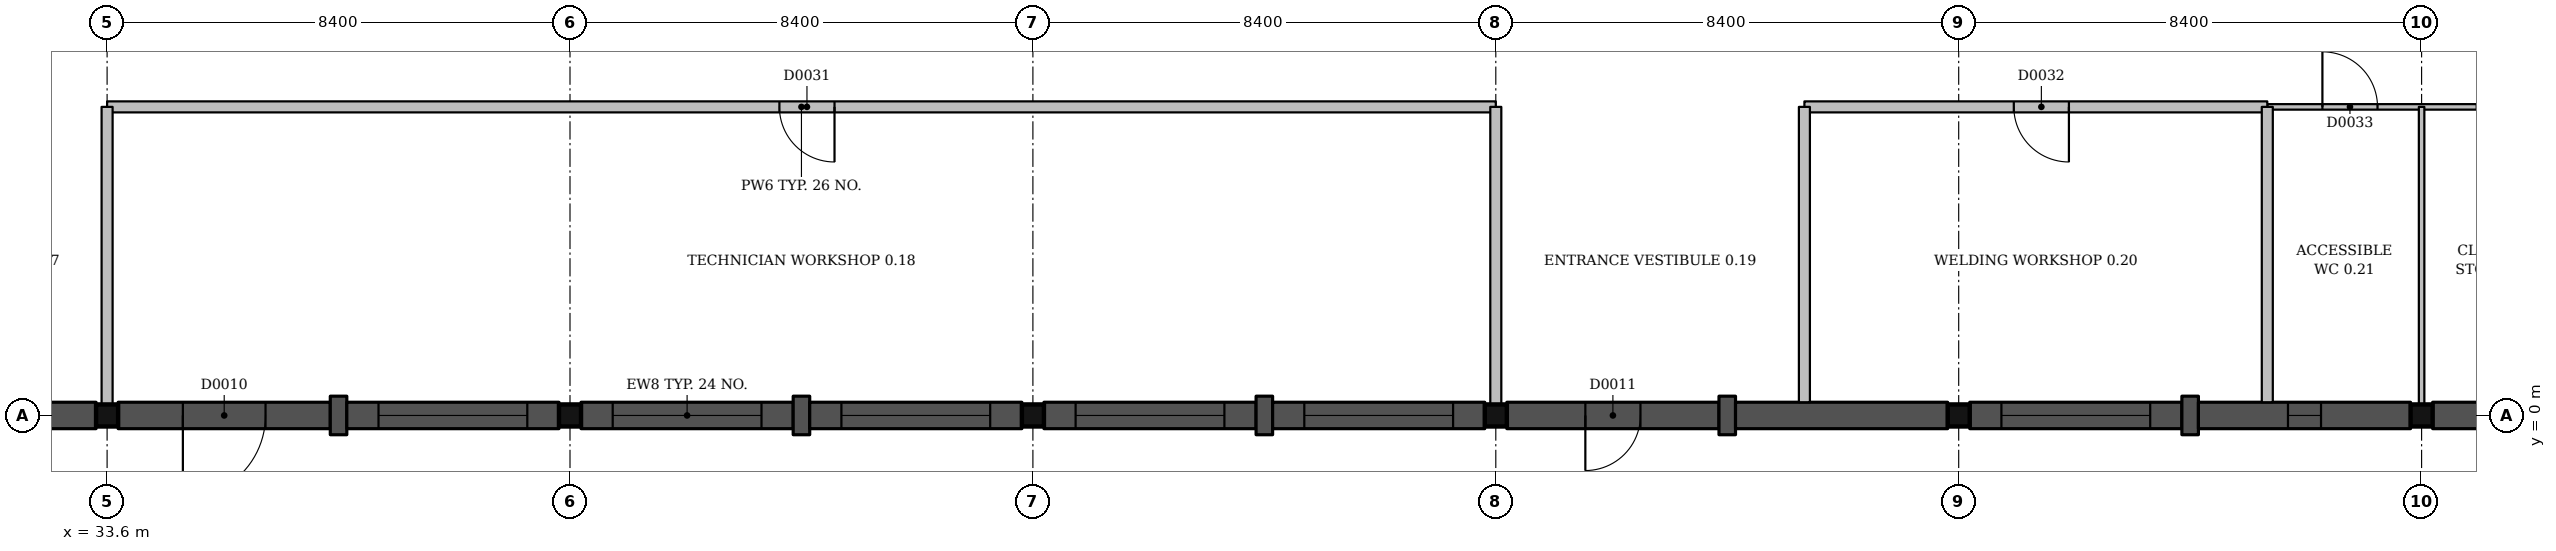
"""IFC4 building model, lengths in metres.
Left out: names, types, materials, properties, quantities, classifications, styles, units other than length and angle.
Written with IfcOpenShell. Run it as: python <this file> out.ifc"""

import sys

from ifc_helpers import new_model, si_unit, direction, frame, frame_2d, origin, origin_2d, place, context, subcontext, project, spatial, rectangle, extrude, element, fill, save


model = new_model("IFC4")
c1 = context("Model", 3, precision=1e-05, world=origin(), true_north=direction((0.0, 1.0)))
c2 = subcontext(c1, "Body", "Model", "MODEL_VIEW")
j1 = project(units=[si_unit("LENGTHUNIT", "METRE"), si_unit("PLANEANGLEUNIT", "RADIAN")], contexts=[c1])
p1 = place(None, origin())
s1 = spatial("IfcSite", under=j1, at=p1, CompositionType="ELEMENT")
p2 = place(p1, origin())
s2 = spatial("IfcBuilding", under=s1, at=p2, CompositionType="ELEMENT")
p3 = place(p2, origin())
s3 = spatial("IfcBuildingStorey", under=s2, at=p3, CompositionType="ELEMENT", Elevation=0.0)
for number, where, z_axis, x_axis in (
    (1, (33.6, 0.0, -1.5), (0.0, 0.0, 1.0), (1.0, 0.0, 0.0)),
    (2, (42.0, 0.0, -1.5), (0.0, 0.0, 1.0), (1.0, 0.0, 0.0)),
    (3, (50.4, 0.0, -1.5), (0.0, 0.0, 1.0), (1.0, 0.0, 0.0)),
    (4, (58.8, 0.0, -1.5), (0.0, 0.0, 1.0), (1.0, 0.0, 0.0)),
    (5, (67.2, 0.0, -1.5), (0.0, 0.0, 1.0), (1.0, 0.0, 0.0)),
    (6, (75.6, 0.0, -1.5), (0.0, 0.0, 1.0), (1.0, 0.0, 0.0)),
):
    element("IfcColumn", number, at=place(p3, frame(where, z_axis=z_axis, x_axis=x_axis)), inside=s3, PredefinedType="COLUMN", context=c2, shape_type="SweptSolid", body=[
        extrude(rectangle(XDim=0.4, YDim=0.4, at=origin_2d()), origin(), (0.0, 0.0, 1.0), 6.0),
    ])
p4 = place(p3, frame((29.55, 0.0, 0.0), z_axis=(0.0, 0.0, 1.0), x_axis=(1.0, 0.0, 0.0)))
e7 = element("IfcWall", 7, at=p4, inside=s3, PredefinedType="SOLIDWALL", context=c2, shape_type="SweptSolid", body=[
    extrude(rectangle(XDim=3.85, YDim=0.48, at=frame_2d((1.925, 0.0))), origin(), (0.0, 0.0, 1.0), 3.45),
])
p5 = place(p4, frame((1.425, 0.0, 0.0)))
e8 = element("IfcOpeningElement", 8, at=p5, cuts=e7, PredefinedType="OPENING", context=c2, shape_type="SweptSolid", body=[
    extrude(rectangle(XDim=1.0, YDim=2.1, at=frame_2d((0.5, 1.05))), frame((0.0, 0.25, 0.0), z_axis=(0.0, -1.0, 0.0), x_axis=(1.0, 0.0, 0.0)), (0.0, 0.0, 1.0), 0.5),
])
p6 = place(p3, frame((33.8, 0.0, 0.0), z_axis=(0.0, 0.0, 1.0), x_axis=(1.0, 0.0, 0.0)))
e9 = element("IfcWall", 9, at=p6, inside=s3, PredefinedType="SOLIDWALL", context=c2, shape_type="SweptSolid", body=[
    extrude(rectangle(XDim=3.85, YDim=0.48, at=frame_2d((1.925, 0.0))), origin(), (0.0, 0.0, 1.0), 3.45),
])
p7 = place(p6, frame((1.175, 0.0, 0.0)))
e10 = element("IfcOpeningElement", 10, at=p7, cuts=e9, PredefinedType="OPENING", context=c2, shape_type="SweptSolid", body=[
    extrude(rectangle(XDim=1.5, YDim=2.1, at=frame_2d((0.75, 1.05))), frame((0.0, 0.25, 0.0), z_axis=(0.0, -1.0, 0.0), x_axis=(1.0, 0.0, 0.0)), (0.0, 0.0, 1.0), 0.5),
])
p8 = place(p3, frame((37.65, 0.0, 0.0), z_axis=(0.0, 0.0, 1.0), x_axis=(1.0, 0.0, 0.0)))
e11 = element("IfcWall", 11, at=p8, inside=s3, PredefinedType="SOLIDWALL", context=c2, shape_type="SweptSolid", body=[
    extrude(rectangle(XDim=0.3, YDim=0.7, at=frame_2d((0.15, 0.0))), origin(), (0.0, 0.0, 1.0), 3.45),
])
p9 = place(p3, frame((37.95, 0.0, 0.0), z_axis=(0.0, 0.0, 1.0), x_axis=(1.0, 0.0, 0.0)))
e12 = element("IfcWall", 12, at=p9, inside=s3, PredefinedType="SOLIDWALL", context=c2, shape_type="SweptSolid", body=[
    extrude(rectangle(XDim=3.85, YDim=0.48, at=frame_2d((1.925, 0.0))), origin(), (0.0, 0.0, 1.0), 3.45),
])
p10 = place(p9, frame((0.575, 0.0, 1.2)))
e13 = element("IfcOpeningElement", 13, at=p10, cuts=e12, PredefinedType="OPENING", context=c2, shape_type="SweptSolid", body=[
    extrude(rectangle(XDim=2.7, YDim=1.8, at=frame_2d((1.35, 0.9))), frame((0.0, 0.25, 0.0), z_axis=(0.0, -1.0, 0.0), x_axis=(1.0, 0.0, 0.0)), (0.0, 0.0, 1.0), 0.5),
])
p11 = place(p3, frame((42.2, 0.0, 0.0), z_axis=(0.0, 0.0, 1.0), x_axis=(1.0, 0.0, 0.0)))
e14 = element("IfcWall", 14, at=p11, inside=s3, PredefinedType="SOLIDWALL", context=c2, shape_type="SweptSolid", body=[
    extrude(rectangle(XDim=3.85, YDim=0.48, at=frame_2d((1.925, 0.0))), origin(), (0.0, 0.0, 1.0), 3.45),
])
p12 = place(p11, frame((0.575, 0.0, 1.2)))
e15 = element("IfcOpeningElement", 15, at=p12, cuts=e14, PredefinedType="OPENING", context=c2, shape_type="SweptSolid", body=[
    extrude(rectangle(XDim=2.7, YDim=1.8, at=frame_2d((1.35, 0.9))), frame((0.0, 0.25, 0.0), z_axis=(0.0, -1.0, 0.0), x_axis=(1.0, 0.0, 0.0)), (0.0, 0.0, 1.0), 0.5),
])
p13 = place(p3, frame((46.05, 0.0, 0.0), z_axis=(0.0, 0.0, 1.0), x_axis=(1.0, 0.0, 0.0)))
e16 = element("IfcWall", 16, at=p13, inside=s3, PredefinedType="SOLIDWALL", context=c2, shape_type="SweptSolid", body=[
    extrude(rectangle(XDim=0.3, YDim=0.7, at=frame_2d((0.15, 0.0))), origin(), (0.0, 0.0, 1.0), 3.45),
])
p14 = place(p3, frame((46.35, 0.0, 0.0), z_axis=(0.0, 0.0, 1.0), x_axis=(1.0, 0.0, 0.0)))
e17 = element("IfcWall", 17, at=p14, inside=s3, PredefinedType="SOLIDWALL", context=c2, shape_type="SweptSolid", body=[
    extrude(rectangle(XDim=3.85, YDim=0.48, at=frame_2d((1.925, 0.0))), origin(), (0.0, 0.0, 1.0), 3.45),
])
p15 = place(p14, frame((0.575, 0.0, 1.2)))
e18 = element("IfcOpeningElement", 18, at=p15, cuts=e17, PredefinedType="OPENING", context=c2, shape_type="SweptSolid", body=[
    extrude(rectangle(XDim=2.7, YDim=1.8, at=frame_2d((1.35, 0.9))), frame((0.0, 0.25, 0.0), z_axis=(0.0, -1.0, 0.0), x_axis=(1.0, 0.0, 0.0)), (0.0, 0.0, 1.0), 0.5),
])
p16 = place(p3, frame((50.6, 0.0, 0.0), z_axis=(0.0, 0.0, 1.0), x_axis=(1.0, 0.0, 0.0)))
e19 = element("IfcWall", 19, at=p16, inside=s3, PredefinedType="SOLIDWALL", context=c2, shape_type="SweptSolid", body=[
    extrude(rectangle(XDim=3.85, YDim=0.48, at=frame_2d((1.925, 0.0))), origin(), (0.0, 0.0, 1.0), 3.45),
])
p17 = place(p16, frame((0.575, 0.0, 1.2)))
e20 = element("IfcOpeningElement", 20, at=p17, cuts=e19, PredefinedType="OPENING", context=c2, shape_type="SweptSolid", body=[
    extrude(rectangle(XDim=2.7, YDim=1.8, at=frame_2d((1.35, 0.9))), frame((0.0, 0.25, 0.0), z_axis=(0.0, -1.0, 0.0), x_axis=(1.0, 0.0, 0.0)), (0.0, 0.0, 1.0), 0.5),
])
p18 = place(p3, frame((54.45, 0.0, 0.0), z_axis=(0.0, 0.0, 1.0), x_axis=(1.0, 0.0, 0.0)))
e21 = element("IfcWall", 21, at=p18, inside=s3, PredefinedType="SOLIDWALL", context=c2, shape_type="SweptSolid", body=[
    extrude(rectangle(XDim=0.3, YDim=0.7, at=frame_2d((0.15, 0.0))), origin(), (0.0, 0.0, 1.0), 3.45),
])
p19 = place(p3, frame((54.75, 0.0, 0.0), z_axis=(0.0, 0.0, 1.0), x_axis=(1.0, 0.0, 0.0)))
e22 = element("IfcWall", 22, at=p19, inside=s3, PredefinedType="SOLIDWALL", context=c2, shape_type="SweptSolid", body=[
    extrude(rectangle(XDim=3.85, YDim=0.48, at=frame_2d((1.925, 0.0))), origin(), (0.0, 0.0, 1.0), 3.45),
])
p20 = place(p19, frame((0.575, 0.0, 1.2)))
e23 = element("IfcOpeningElement", 23, at=p20, cuts=e22, PredefinedType="OPENING", context=c2, shape_type="SweptSolid", body=[
    extrude(rectangle(XDim=2.7, YDim=1.8, at=frame_2d((1.35, 0.9))), frame((0.0, 0.25, 0.0), z_axis=(0.0, -1.0, 0.0), x_axis=(1.0, 0.0, 0.0)), (0.0, 0.0, 1.0), 0.5),
])
p21 = place(p3, frame((59.0, 0.0, 0.0), z_axis=(0.0, 0.0, 1.0), x_axis=(1.0, 0.0, 0.0)))
e24 = element("IfcWall", 24, at=p21, inside=s3, PredefinedType="SOLIDWALL", context=c2, shape_type="SweptSolid", body=[
    extrude(rectangle(XDim=3.85, YDim=0.48, at=frame_2d((1.925, 0.0))), origin(), (0.0, 0.0, 1.0), 3.45),
])
p22 = place(p21, frame((1.425, 0.0, 0.0)))
e25 = element("IfcOpeningElement", 25, at=p22, cuts=e24, PredefinedType="OPENING", context=c2, shape_type="SweptSolid", body=[
    extrude(rectangle(XDim=1.0, YDim=2.1, at=frame_2d((0.5, 1.05))), frame((0.0, 0.25, 0.0), z_axis=(0.0, -1.0, 0.0), x_axis=(1.0, 0.0, 0.0)), (0.0, 0.0, 1.0), 0.5),
])
p23 = place(p3, frame((62.85, 0.0, 0.0), z_axis=(0.0, 0.0, 1.0), x_axis=(1.0, 0.0, 0.0)))
e26 = element("IfcWall", 26, at=p23, inside=s3, PredefinedType="SOLIDWALL", context=c2, shape_type="SweptSolid", body=[
    extrude(rectangle(XDim=0.3, YDim=0.7, at=frame_2d((0.15, 0.0))), origin(), (0.0, 0.0, 1.0), 3.45),
])
p24 = place(p3, frame((63.15, 0.0, 0.0), z_axis=(0.0, 0.0, 1.0), x_axis=(1.0, 0.0, 0.0)))
e27 = element("IfcWall", 27, at=p24, inside=s3, PredefinedType="SOLIDWALL", context=c2, shape_type="SweptSolid", body=[
    extrude(rectangle(XDim=3.85, YDim=0.48, at=frame_2d((1.925, 0.0))), origin(), (0.0, 0.0, 1.0), 3.45),
])
p25 = place(p3, frame((67.4, 0.0, 0.0), z_axis=(0.0, 0.0, 1.0), x_axis=(1.0, 0.0, 0.0)))
e28 = element("IfcWall", 28, at=p25, inside=s3, PredefinedType="SOLIDWALL", context=c2, shape_type="SweptSolid", body=[
    extrude(rectangle(XDim=3.85, YDim=0.48, at=frame_2d((1.925, 0.0))), origin(), (0.0, 0.0, 1.0), 3.45),
])
p26 = place(p25, frame((0.575, 0.0, 1.2)))
e29 = element("IfcOpeningElement", 29, at=p26, cuts=e28, PredefinedType="OPENING", context=c2, shape_type="SweptSolid", body=[
    extrude(rectangle(XDim=2.7, YDim=1.8, at=frame_2d((1.35, 0.9))), frame((0.0, 0.25, 0.0), z_axis=(0.0, -1.0, 0.0), x_axis=(1.0, 0.0, 0.0)), (0.0, 0.0, 1.0), 0.5),
])
p27 = place(p3, frame((71.25, 0.0, 0.0), z_axis=(0.0, 0.0, 1.0), x_axis=(1.0, 0.0, 0.0)))
e30 = element("IfcWall", 30, at=p27, inside=s3, PredefinedType="SOLIDWALL", context=c2, shape_type="SweptSolid", body=[
    extrude(rectangle(XDim=0.3, YDim=0.7, at=frame_2d((0.15, 0.0))), origin(), (0.0, 0.0, 1.0), 3.45),
])
p28 = place(p3, frame((71.55, 0.0, 0.0), z_axis=(0.0, 0.0, 1.0), x_axis=(1.0, 0.0, 0.0)))
e31 = element("IfcWall", 31, at=p28, inside=s3, PredefinedType="SOLIDWALL", context=c2, shape_type="SweptSolid", body=[
    extrude(rectangle(XDim=3.85, YDim=0.48, at=frame_2d((1.925, 0.0))), origin(), (0.0, 0.0, 1.0), 3.45),
])
p29 = place(p28, frame((1.625, 0.0, 1.5)))
e32 = element("IfcOpeningElement", 32, at=p29, cuts=e31, PredefinedType="OPENING", context=c2, shape_type="SweptSolid", body=[
    extrude(rectangle(XDim=0.6, YDim=1.2, at=frame_2d((0.3, 0.6))), frame((0.0, 0.25, 0.0), z_axis=(0.0, -1.0, 0.0), x_axis=(1.0, 0.0, 0.0)), (0.0, 0.0, 1.0), 0.5),
])
p30 = place(p3, frame((75.8, 0.0, 0.0), z_axis=(0.0, 0.0, 1.0), x_axis=(1.0, 0.0, 0.0)))
e33 = element("IfcWall", 33, at=p30, inside=s3, PredefinedType="SOLIDWALL", context=c2, shape_type="SweptSolid", body=[
    extrude(rectangle(XDim=3.85, YDim=0.48, at=frame_2d((1.925, 0.0))), origin(), (0.0, 0.0, 1.0), 3.45),
])
p31 = place(p30, frame((1.15, 0.0, 2.4)))
e34 = element("IfcOpeningElement", 34, at=p31, cuts=e33, PredefinedType="OPENING", context=c2, shape_type="SweptSolid", body=[
    extrude(rectangle(XDim=1.2, YDim=0.6, at=frame_2d((0.6, 0.3))), frame((0.0, 0.25, 0.0), z_axis=(0.0, -1.0, 0.0), x_axis=(1.0, 0.0, 0.0)), (0.0, 0.0, 1.0), 0.5),
])
p32 = place(p3, frame((72.8, 5.6, 0.0), z_axis=(0.0, 0.0, 1.0), x_axis=(1.0, 0.0, 0.0)))
e35 = element("IfcWall", 35, at=p32, inside=s3, PredefinedType="PARTITIONING", context=c2, shape_type="SweptSolid", body=[
    extrude(rectangle(XDim=5.6, YDim=0.1, at=frame_2d((2.8, 0.0))), origin(), (0.0, 0.0, 1.0), 3.5),
])
p33 = place(p32, frame((1.0, 0.0, 0.0)))
e36 = element("IfcOpeningElement", 36, at=p33, cuts=e35, PredefinedType="OPENING", context=c2, shape_type="SweptSolid", body=[
    extrude(rectangle(XDim=1.0, YDim=2.1, at=frame_2d((0.5, 1.05))), frame((0.0, 0.06, 0.0), z_axis=(0.0, -1.0, 0.0), x_axis=(1.0, 0.0, 0.0)), (0.0, 0.0, 1.0), 0.12),
])
p34 = place(p32, frame((3.8, 0.0, 0.0)))
e37 = element("IfcOpeningElement", 37, at=p34, cuts=e35, PredefinedType="OPENING", context=c2, shape_type="SweptSolid", body=[
    extrude(rectangle(XDim=0.9, YDim=2.1, at=frame_2d((0.45, 1.05))), frame((0.0, 0.06, 0.0), z_axis=(0.0, -1.0, 0.0), x_axis=(1.0, 0.0, 0.0)), (0.0, 0.0, 1.0), 0.12),
])
p35 = place(p3, frame((33.6, 5.6, 0.0), z_axis=(0.0, 0.0, 1.0), x_axis=(1.0, 0.0, 0.0)))
e38 = element("IfcWall", 38, at=p35, inside=s3, PredefinedType="PARTITIONING", context=c2, shape_type="SweptSolid", body=[
    extrude(rectangle(XDim=25.2, YDim=0.2, at=frame_2d((12.6, 0.0))), origin(), (0.0, 0.0, 1.0), 3.5),
])
p36 = place(p35, frame((12.2, 0.0, 0.0)))
e39 = element("IfcOpeningElement", 39, at=p36, cuts=e38, PredefinedType="OPENING", context=c2, shape_type="SweptSolid", body=[
    extrude(rectangle(XDim=1.0, YDim=2.1, at=frame_2d((0.5, 1.05))), frame((0.0, 0.11, 0.0), z_axis=(0.0, -1.0, 0.0), x_axis=(1.0, 0.0, 0.0)), (0.0, 0.0, 1.0), 0.22),
])
p37 = place(p3, frame((64.4, 5.6, 0.0), z_axis=(0.0, 0.0, 1.0), x_axis=(1.0, 0.0, 0.0)))
e40 = element("IfcWall", 40, at=p37, inside=s3, PredefinedType="PARTITIONING", context=c2, shape_type="SweptSolid", body=[
    extrude(rectangle(XDim=8.4, YDim=0.2, at=frame_2d((4.2, 0.0))), origin(), (0.0, 0.0, 1.0), 3.5),
])
p38 = place(p37, frame((3.8, 0.0, 0.0)))
e41 = element("IfcOpeningElement", 41, at=p38, cuts=e40, PredefinedType="OPENING", context=c2, shape_type="SweptSolid", body=[
    extrude(rectangle(XDim=1.0, YDim=2.1, at=frame_2d((0.5, 1.05))), frame((0.0, 0.11, 0.0), z_axis=(0.0, -1.0, 0.0), x_axis=(1.0, 0.0, 0.0)), (0.0, 0.0, 1.0), 0.22),
])
for number, where, z_axis, x_axis in (
    (42, (33.6, 0.2, 0.0), (0.0, 0.0, 1.0), (0.0, 1.0, 0.0)),
    (43, (58.8, 0.2, 0.0), (0.0, 0.0, 1.0), (0.0, 1.0, 0.0)),
):
    element("IfcWall", number, at=place(p3, frame(where, z_axis=z_axis, x_axis=x_axis)), inside=s3, PredefinedType="PARTITIONING", context=c2, shape_type="SweptSolid", body=[
        extrude(rectangle(XDim=5.4, YDim=0.2, at=frame_2d((2.7, 0.0))), origin(), (0.0, 0.0, 1.0), 3.5),
    ])
for number, where, z_axis, x_axis in (
    (44, (64.4, 0.24, 0.0), (0.0, 0.0, 1.0), (0.0, 1.0, 0.0)),
    (45, (72.8, 0.24, 0.0), (0.0, 0.0, 1.0), (0.0, 1.0, 0.0)),
):
    element("IfcWall", number, at=place(p3, frame(where, z_axis=z_axis, x_axis=x_axis)), inside=s3, PredefinedType="PARTITIONING", context=c2, shape_type="SweptSolid", body=[
        extrude(rectangle(XDim=5.36, YDim=0.2, at=frame_2d((2.68, 0.0))), origin(), (0.0, 0.0, 1.0), 4.15),
    ])
p39 = place(p3, frame((75.6, 0.2, 0.0), z_axis=(0.0, 0.0, 1.0), x_axis=(0.0, 1.0, 0.0)))
e46 = element("IfcWall", 46, at=p39, inside=s3, PredefinedType="PARTITIONING", context=c2, shape_type="SweptSolid", body=[
    extrude(rectangle(XDim=5.4, YDim=0.1, at=frame_2d((2.7, 0.0))), origin(), (0.0, 0.0, 1.0), 3.5),
])
p40 = place(p7, origin())
e47 = element("IfcDoor", 47, at=p40, inside=s3, OperationType="SINGLE_SWING_LEFT", PredefinedType="DOOR", context=c2, shape_type="SweptSolid", body=[
    extrude(rectangle(XDim=1.5, YDim=2.1, at=frame_2d((0.75, 1.05))), frame((0.0, 0.025, 0.0), z_axis=(0.0, -1.0, 0.0), x_axis=(1.0, 0.0, 0.0)), (0.0, 0.0, 1.0), 0.05),
])
fill(e10, e47)
p41 = place(p10, origin())
e48 = element("IfcWindow", 48, at=p41, inside=s3, PartitioningType="SINGLE_PANEL", PredefinedType="WINDOW", context=c2, shape_type="SweptSolid", body=[
    extrude(rectangle(XDim=2.7, YDim=1.8, at=frame_2d((1.35, 0.9))), frame((0.0, 0.12, 0.0), z_axis=(0.0, -1.0, 0.0), x_axis=(1.0, 0.0, 0.0)), (0.0, 0.0, 1.0), 0.06),
])
fill(e13, e48)
p42 = place(p12, origin())
e49 = element("IfcWindow", 49, at=p42, inside=s3, PartitioningType="SINGLE_PANEL", PredefinedType="WINDOW", context=c2, shape_type="SweptSolid", body=[
    extrude(rectangle(XDim=2.7, YDim=1.8, at=frame_2d((1.35, 0.9))), frame((0.0, 0.12, 0.0), z_axis=(0.0, -1.0, 0.0), x_axis=(1.0, 0.0, 0.0)), (0.0, 0.0, 1.0), 0.06),
])
fill(e15, e49)
p43 = place(p15, origin())
e50 = element("IfcWindow", 50, at=p43, inside=s3, PartitioningType="SINGLE_PANEL", PredefinedType="WINDOW", context=c2, shape_type="SweptSolid", body=[
    extrude(rectangle(XDim=2.7, YDim=1.8, at=frame_2d((1.35, 0.9))), frame((0.0, 0.12, 0.0), z_axis=(0.0, -1.0, 0.0), x_axis=(1.0, 0.0, 0.0)), (0.0, 0.0, 1.0), 0.06),
])
fill(e18, e50)
p44 = place(p17, origin())
e51 = element("IfcWindow", 51, at=p44, inside=s3, PartitioningType="SINGLE_PANEL", PredefinedType="WINDOW", context=c2, shape_type="SweptSolid", body=[
    extrude(rectangle(XDim=2.7, YDim=1.8, at=frame_2d((1.35, 0.9))), frame((0.0, 0.12, 0.0), z_axis=(0.0, -1.0, 0.0), x_axis=(1.0, 0.0, 0.0)), (0.0, 0.0, 1.0), 0.06),
])
fill(e20, e51)
p45 = place(p20, origin())
e52 = element("IfcWindow", 52, at=p45, inside=s3, PartitioningType="SINGLE_PANEL", PredefinedType="WINDOW", context=c2, shape_type="SweptSolid", body=[
    extrude(rectangle(XDim=2.7, YDim=1.8, at=frame_2d((1.35, 0.9))), frame((0.0, 0.12, 0.0), z_axis=(0.0, -1.0, 0.0), x_axis=(1.0, 0.0, 0.0)), (0.0, 0.0, 1.0), 0.06),
])
fill(e23, e52)
p46 = place(p22, origin())
e53 = element("IfcDoor", 53, at=p46, inside=s3, OperationType="SINGLE_SWING_LEFT", PredefinedType="DOOR", context=c2, shape_type="SweptSolid", body=[
    extrude(rectangle(XDim=1.0, YDim=2.1, at=frame_2d((0.5, 1.05))), frame((0.0, 0.025, 0.0), z_axis=(0.0, -1.0, 0.0), x_axis=(1.0, 0.0, 0.0)), (0.0, 0.0, 1.0), 0.05),
])
fill(e25, e53)
p47 = place(p26, origin())
e54 = element("IfcWindow", 54, at=p47, inside=s3, PartitioningType="SINGLE_PANEL", PredefinedType="WINDOW", context=c2, shape_type="SweptSolid", body=[
    extrude(rectangle(XDim=2.7, YDim=1.8, at=frame_2d((1.35, 0.9))), frame((0.0, 0.12, 0.0), z_axis=(0.0, -1.0, 0.0), x_axis=(1.0, 0.0, 0.0)), (0.0, 0.0, 1.0), 0.06),
])
fill(e29, e54)
p48 = place(p29, origin())
e55 = element("IfcWindow", 55, at=p48, inside=s3, PartitioningType="SINGLE_PANEL", PredefinedType="WINDOW", context=c2, shape_type="SweptSolid", body=[
    extrude(rectangle(XDim=0.6, YDim=1.2, at=frame_2d((0.3, 0.6))), frame((0.0, 0.12, 0.0), z_axis=(0.0, -1.0, 0.0), x_axis=(1.0, 0.0, 0.0)), (0.0, 0.0, 1.0), 0.06),
])
fill(e32, e55)
p49 = place(p36, origin())
e56 = element("IfcDoor", 56, at=p49, inside=s3, OperationType="SINGLE_SWING_RIGHT", PredefinedType="DOOR", context=c2, shape_type="SweptSolid", body=[
    extrude(rectangle(XDim=1.0, YDim=2.1, at=frame_2d((0.5, 1.05))), frame((0.0, 0.025, 0.0), z_axis=(0.0, -1.0, 0.0), x_axis=(1.0, 0.0, 0.0)), (0.0, 0.0, 1.0), 0.05),
])
fill(e39, e56)
p50 = place(p38, origin())
e57 = element("IfcDoor", 57, at=p50, inside=s3, OperationType="SINGLE_SWING_RIGHT", PredefinedType="DOOR", context=c2, shape_type="SweptSolid", body=[
    extrude(rectangle(XDim=1.0, YDim=2.1, at=frame_2d((0.5, 1.05))), frame((0.0, 0.025, 0.0), z_axis=(0.0, -1.0, 0.0), x_axis=(1.0, 0.0, 0.0)), (0.0, 0.0, 1.0), 0.05),
])
fill(e41, e57)
p51 = place(p33, origin())
e58 = element("IfcDoor", 58, at=p51, inside=s3, OperationType="SINGLE_SWING_LEFT", PredefinedType="DOOR", context=c2, shape_type="SweptSolid", body=[
    extrude(rectangle(XDim=1.0, YDim=2.1, at=frame_2d((0.5, 1.05))), frame((0.0, 0.025, 0.0), z_axis=(0.0, -1.0, 0.0), x_axis=(1.0, 0.0, 0.0)), (0.0, 0.0, 1.0), 0.05),
])
fill(e36, e58)
save(model, sys.argv[1])
